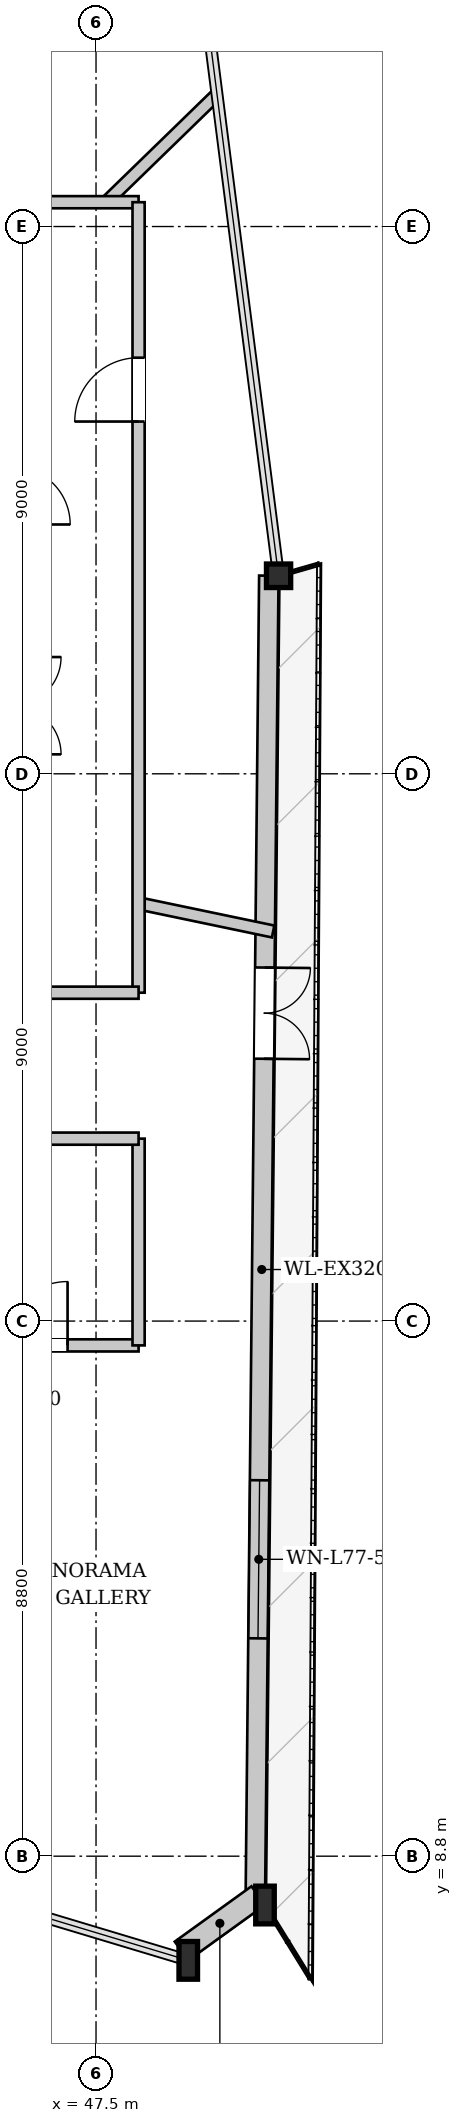
"""IFC4 building model, lengths in metres.
Left out: names, types, materials, properties, quantities, classifications, styles, units other than length and angle.
Written with IfcOpenShell. Run it as: python <this file> out.ifc"""

import sys

from ifc_helpers import new_model, si_unit, direction, frame, frame_2d, origin, origin_2d, place, context, subcontext, project, spatial, rectangle, i_section, extrude, source, transform, mapped, element, fill, save


model = new_model("IFC4")
c1 = context("Model", 3, precision=1e-05, world=origin(), true_north=direction((0.0, 1.0)))
c2 = subcontext(c1, "Body", "Model", "MODEL_VIEW")
j1 = project(units=[si_unit("LENGTHUNIT", "METRE"), si_unit("PLANEANGLEUNIT", "RADIAN")], contexts=[c1])
p1 = place(None, origin())
s1 = spatial("IfcSite", under=j1, at=p1, CompositionType="ELEMENT")
p2 = place(p1, origin())
s2 = spatial("IfcBuilding", under=s1, at=p2, CompositionType="ELEMENT")
p3 = place(p2, frame((0.0, 0.0, 290.5)))
s3 = spatial("IfcBuildingStorey", under=s2, at=p3, CompositionType="ELEMENT", Elevation=290.5)
m1 = source(origin(), c2, "Body", "SweptSolid", [
    extrude(i_section(OverallWidth=0.305, OverallDepth=0.62, WebThickness=0.021, FlangeThickness=0.04, at=origin_2d()), origin(), (0.0, 0.0, 1.0), 4.255),
])
for number, where, z_axis, x_axis in (
    (1, (49.017, 7.087, 0.0), (0.0, 0.0, 1.0), (1.0, 0.0, 0.0)),
    (2, (50.279, 7.997, 0.0), (0.0, 0.0, 1.0), (1.0, 0.0, 0.0)),
):
    element("IfcColumn", number, at=place(p3, frame(where, z_axis=z_axis, x_axis=x_axis)), inside=s3, PredefinedType="COLUMN", context=c2, shape_type="MappedRepresentation", body=[
        mapped(m1, transform((0.0, 0.0, 0.0), x_axis=(1.0, 0.0, 0.0), y_axis=(0.0, 1.0, 0.0), z_axis=(0.0, 0.0, 1.0), scale=1.0)),
    ])
m2 = source(origin(), c2, "Body", "SweptSolid", [
    extrude(i_section(OverallWidth=0.398, OverallDepth=0.387, WebThickness=0.019, FlangeThickness=0.029, at=origin_2d()), origin(), (0.0, 0.0, 1.0), 4.255),
])
p4 = place(p3, frame((50.502, 29.857, 0.0), z_axis=(0.0, 0.0, 1.0), x_axis=(1.0, 0.0, 0.0)))
e3 = element("IfcColumn", 3, at=p4, inside=s3, PredefinedType="COLUMN", context=c2, shape_type="MappedRepresentation", body=[
    mapped(m2, transform((0.0, 0.0, 0.0), x_axis=(1.0, 0.0, 0.0), y_axis=(0.0, 1.0, 0.0), z_axis=(0.0, 0.0, 1.0), scale=1.0)),
])
p5 = place(p3, frame((50.342, 29.858, 0.0), z_axis=(0.0, 0.0, 1.0), x_axis=(-0.010207538584, -0.999947901721, 0.0)))
e4 = element("IfcWall", 4, at=p5, inside=s3, PredefinedType="SOLIDWALL", context=c2, shape_type="SweptSolid", body=[
    extrude(rectangle(XDim=21.861, YDim=0.32, at=frame_2d((10.93, 0.0))), origin(), (0.0, 0.0, 1.0), 3.782),
])
p6 = place(p5, frame((6.445, 0.0, 0.0)))
e5 = element("IfcOpeningElement", 5, at=p6, cuts=e4, PredefinedType="OPENING", context=c2, shape_type="SweptSolid", body=[
    extrude(rectangle(XDim=1.5, YDim=2.3, at=frame_2d((0.75, 1.15))), frame((0.0, 0.17, 0.0), z_axis=(0.0, -1.0, 0.0), x_axis=(1.0, 0.0, 0.0)), (0.0, 0.0, 1.0), 0.34),
])
p7 = place(p5, frame((14.877, 0.0, 0.65)))
e6 = element("IfcOpeningElement", 6, at=p7, cuts=e4, PredefinedType="OPENING", context=c2, shape_type="SweptSolid", body=[
    extrude(rectangle(XDim=2.6, YDim=2.35, at=frame_2d((1.3, 1.175))), frame((0.0, 0.17, 0.0), z_axis=(0.0, -1.0, 0.0), x_axis=(1.0, 0.0, 0.0)), (0.0, 0.0, 1.0), 0.34),
])
p8 = place(p3, frame((50.168, 8.151, 0.0), z_axis=(0.0, 0.0, 1.0), x_axis=(-0.811063846967, -0.584957636195, 0.0)))
e7 = element("IfcWall", 7, at=p8, inside=s3, PredefinedType="SOLIDWALL", context=c2, shape_type="SweptSolid", body=[
    extrude(rectangle(XDim=1.556, YDim=0.38, at=frame_2d((0.778, 0.0))), origin(), (0.0, 0.0, 1.0), 3.782),
])
p9 = place(p3, frame((30.847, 37.549, 0.0), z_axis=(0.0, 0.0, 1.0), x_axis=(0.743983447959, 0.668198046363, 0.0)))
e8 = element("IfcWall", 8, at=p9, inside=s3, PredefinedType="SOLIDWALL", context=c2, shape_type="SweptSolid", body=[
    extrude(rectangle(XDim=21.368, YDim=0.32, at=frame_2d((10.684, 0.0))), origin(), (0.0, 0.0, 1.0), 3.782),
])
p10 = place(p9, frame((6.838, 0.0, 0.0)))
e9 = element("IfcOpeningElement", 9, at=p10, cuts=e8, PredefinedType="OPENING", context=c2, shape_type="SweptSolid", body=[
    extrude(rectangle(XDim=1.5, YDim=2.3, at=frame_2d((0.75, 1.15))), frame((0.0, 0.17, 0.0), z_axis=(0.0, -1.0, 0.0), x_axis=(1.0, 0.0, 0.0)), (0.0, 0.0, 1.0), 0.34),
])
p11 = place(p9, frame((14.512, 0.0, 0.65)))
e10 = element("IfcOpeningElement", 10, at=p11, cuts=e8, PredefinedType="OPENING", context=c2, shape_type="SweptSolid", body=[
    extrude(rectangle(XDim=2.6, YDim=2.35, at=frame_2d((1.3, 1.175))), frame((0.0, 0.17, 0.0), z_axis=(0.0, -1.0, 0.0), x_axis=(1.0, 0.0, 0.0)), (0.0, 0.0, 1.0), 0.34),
])
p12 = place(p3, frame((48.2, 24.469, 0.0), z_axis=(0.0, 0.0, 1.0), x_axis=(0.978870641426, -0.204480481596, 0.0)))
e11 = element("IfcWall", 11, at=p12, inside=s3, PredefinedType="PARTITIONING", context=c2, shape_type="SweptSolid", body=[
    extrude(rectangle(XDim=2.26, YDim=0.2, at=frame_2d((1.13, 0.0))), origin(), (0.0, 0.0, 1.0), 4.24),
])
p13 = place(p3, frame((47.666, 36.0, 0.0), z_axis=(0.0, 0.0, 1.0), x_axis=(0.716875909167, 0.697200782312, 0.0)))
e12 = element("IfcWall", 12, at=p13, inside=s3, PredefinedType="PARTITIONING", context=c2, shape_type="SweptSolid", body=[
    extrude(rectangle(XDim=2.507, YDim=0.2, at=frame_2d((1.253, 0.0))), origin(), (0.0, 0.0, 1.0), 4.24),
])
p14 = place(p3, frame((27.8, 17.2, 0.0), z_axis=(0.0, 0.0, 1.0), x_axis=(1.0, 0.0, 0.0)))
e13 = element("IfcWall", 13, at=p14, inside=s3, PredefinedType="PARTITIONING", context=c2, shape_type="SweptSolid", body=[
    extrude(rectangle(XDim=20.4, YDim=0.2, at=frame_2d((10.2, 0.0))), origin(), (0.0, 0.0, 1.0), 3.865),
])
p15 = place(p14, frame((7.835, 0.0, 0.0)))
e14 = element("IfcOpeningElement", 14, at=p15, cuts=e13, PredefinedType="OPENING", context=c2, shape_type="SweptSolid", body=[
    extrude(rectangle(XDim=1.05, YDim=2.2, at=frame_2d((0.525, 1.1))), frame((0.0, 0.11, 0.0), z_axis=(0.0, -1.0, 0.0), x_axis=(1.0, 0.0, 0.0)), (0.0, 0.0, 1.0), 0.22),
])
p16 = place(p14, frame((18.182, 0.0, 0.0)))
e15 = element("IfcOpeningElement", 15, at=p16, cuts=e13, PredefinedType="OPENING", context=c2, shape_type="SweptSolid", body=[
    extrude(rectangle(XDim=1.05, YDim=2.2, at=frame_2d((0.525, 1.1))), frame((0.0, 0.11, 0.0), z_axis=(0.0, -1.0, 0.0), x_axis=(1.0, 0.0, 0.0)), (0.0, 0.0, 1.0), 0.22),
])
p17 = place(p3, frame((29.378, 36.0, 0.0), z_axis=(0.0, 0.0, 1.0), x_axis=(1.0, 0.0, 0.0)))
e16 = element("IfcWall", 16, at=p17, inside=s3, PredefinedType="PARTITIONING", context=c2, shape_type="SweptSolid", body=[
    extrude(rectangle(XDim=18.822, YDim=0.2, at=frame_2d((9.411, 0.0))), origin(), (0.0, 0.0, 1.0), 4.24),
])
p18 = place(p17, frame((14.566, 0.0, 0.0)))
e17 = element("IfcOpeningElement", 17, at=p18, cuts=e16, PredefinedType="OPENING", context=c2, shape_type="SweptSolid", body=[
    extrude(rectangle(XDim=1.05, YDim=2.2, at=frame_2d((0.525, 1.1))), frame((0.0, 0.11, 0.0), z_axis=(0.0, -1.0, 0.0), x_axis=(1.0, 0.0, 0.0)), (0.0, 0.0, 1.0), 0.22),
])
p19 = place(p17, frame((4.529, 0.0, 0.0)))
e18 = element("IfcOpeningElement", 18, at=p19, cuts=e16, PredefinedType="OPENING", context=c2, shape_type="SweptSolid", body=[
    extrude(rectangle(XDim=1.05, YDim=2.2, at=frame_2d((0.525, 1.1))), frame((0.0, 0.11, 0.0), z_axis=(0.0, -1.0, 0.0), x_axis=(1.0, 0.0, 0.0)), (0.0, 0.0, 1.0), 0.22),
])
p20 = place(p3, frame((48.2, 17.2, 0.0), z_axis=(0.0, 0.0, 1.0), x_axis=(0.0, 1.0, 0.0)))
e19 = element("IfcWall", 19, at=p20, inside=s3, PredefinedType="PARTITIONING", context=c2, shape_type="SweptSolid", body=[
    extrude(rectangle(XDim=3.4, YDim=0.2, at=frame_2d((1.7, 0.0))), origin(), (0.0, 0.0, 1.0), 4.24),
])
p21 = place(p3, frame((46.35, 20.6, 0.0), z_axis=(0.0, 0.0, 1.0), x_axis=(1.0, 0.0, 0.0)))
e20 = element("IfcWall", 20, at=p21, inside=s3, PredefinedType="PARTITIONING", context=c2, shape_type="SweptSolid", body=[
    extrude(rectangle(XDim=1.85, YDim=0.2, at=frame_2d((0.925, 0.0))), origin(), (0.0, 0.0, 1.0), 4.24),
])
p22 = place(p3, frame((48.2, 23.0, 0.0), z_axis=(0.0, 0.0, 1.0), x_axis=(0.0, 1.0, 0.0)))
e21 = element("IfcWall", 21, at=p22, inside=s3, PredefinedType="PARTITIONING", context=c2, shape_type="SweptSolid", body=[
    extrude(rectangle(XDim=13.0, YDim=0.2, at=frame_2d((6.5, 0.0))), origin(), (0.0, 0.0, 1.0), 3.925),
])
p23 = place(p22, frame((9.393, 0.0, 0.0)))
e22 = element("IfcOpeningElement", 22, at=p23, cuts=e21, PredefinedType="OPENING", context=c2, shape_type="SweptSolid", body=[
    extrude(rectangle(XDim=1.05, YDim=2.2, at=frame_2d((0.525, 1.1))), frame((0.0, 0.11, 0.0), z_axis=(0.0, -1.0, 0.0), x_axis=(1.0, 0.0, 0.0)), (0.0, 0.0, 1.0), 0.22),
])
p24 = place(p3, frame((46.35, 23.0, 0.0), z_axis=(0.0, 0.0, 1.0), x_axis=(1.0, 0.0, 0.0)))
e23 = element("IfcWall", 23, at=p24, inside=s3, PredefinedType="PARTITIONING", context=c2, shape_type="SweptSolid", body=[
    extrude(rectangle(XDim=1.85, YDim=0.2, at=frame_2d((0.925, 0.0))), origin(), (0.0, 0.0, 1.0), 4.24),
])
m3 = source(origin(), c2, "Body", "SweptSolid", [
    extrude(rectangle(XDim=1.5, YDim=2.3, at=frame_2d((0.75, 1.15))), frame((0.0, 0.025, 0.0), z_axis=(0.0, -1.0, 0.0), x_axis=(1.0, 0.0, 0.0)), (0.0, 0.0, 1.0), 0.05),
])
p25 = place(p6, origin())
e24 = element("IfcDoor", 24, at=p25, inside=s3, OperationType="DOUBLE_DOOR_SINGLE_SWING", PredefinedType="DOOR", context=c2, shape_type="MappedRepresentation", body=[
    mapped(m3, transform((0.0, 0.0, 0.0), x_axis=(1.0, 0.0, 0.0), y_axis=(0.0, 1.0, 0.0), z_axis=(0.0, 0.0, 1.0), scale=1.0)),
])
fill(e5, e24)
m4 = source(origin(), c2, "Body", "SweptSolid", [
    extrude(rectangle(XDim=2.6, YDim=2.35, at=frame_2d((1.3, 1.175))), frame((0.0, 0.03, 0.0), z_axis=(0.0, -1.0, 0.0), x_axis=(1.0, 0.0, 0.0)), (0.0, 0.0, 1.0), 0.06),
])
p26 = place(p7, origin())
e25 = element("IfcWindow", 25, at=p26, inside=s3, PartitioningType="SINGLE_PANEL", PredefinedType="WINDOW", context=c2, shape_type="MappedRepresentation", body=[
    mapped(m4, transform((0.0, 0.0, 0.0), x_axis=(1.0, 0.0, 0.0), y_axis=(0.0, 1.0, 0.0), z_axis=(0.0, 0.0, 1.0), scale=1.0)),
])
fill(e6, e25)
m5 = source(origin(), c2, "Body", "SweptSolid", [
    extrude(rectangle(XDim=1.05, YDim=2.2, at=frame_2d((0.525, 1.1))), frame((0.0, 0.025, 0.0), z_axis=(0.0, -1.0, 0.0), x_axis=(1.0, 0.0, 0.0)), (0.0, 0.0, 1.0), 0.05),
])
p27 = place(p16, origin())
e26 = element("IfcDoor", 26, at=p27, inside=s3, OperationType="SINGLE_SWING_RIGHT", PredefinedType="DOOR", context=c2, shape_type="MappedRepresentation", body=[
    mapped(m5, transform((0.0, 0.0, 0.0), x_axis=(1.0, 0.0, 0.0), y_axis=(0.0, 1.0, 0.0), z_axis=(0.0, 0.0, 1.0), scale=1.0)),
])
fill(e15, e26)
p28 = place(p23, origin())
e27 = element("IfcDoor", 27, at=p28, inside=s3, OperationType="SINGLE_SWING_LEFT", PredefinedType="DOOR", context=c2, shape_type="MappedRepresentation", body=[
    mapped(m5, transform((0.0, 0.0, 0.0), x_axis=(1.0, 0.0, 0.0), y_axis=(0.0, 1.0, 0.0), z_axis=(0.0, 0.0, 1.0), scale=1.0)),
])
fill(e22, e27)
save(model, sys.argv[1])
